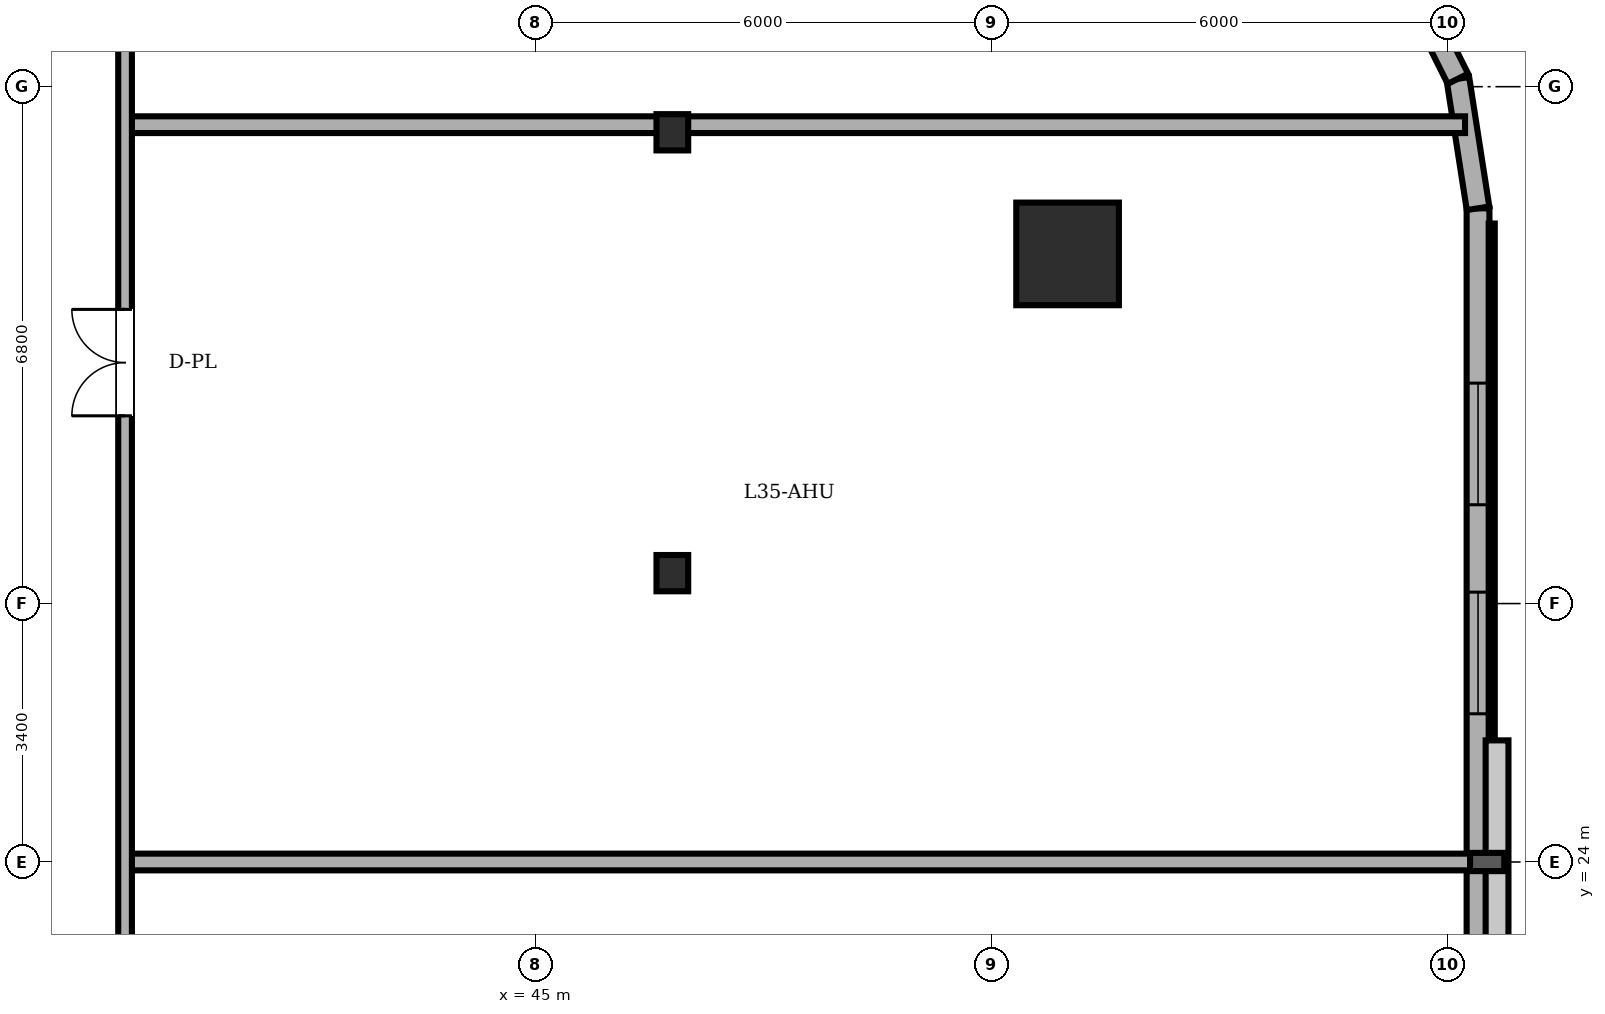
"""IFC4 building model, lengths in metres.
Left out: names, types, materials, properties, quantities, classifications, styles, units other than length and angle.
Written with IfcOpenShell. Run it as: python <this file> out.ifc"""

import sys

from ifc_helpers import new_model, si_unit, direction, frame, frame_2d, origin, origin_2d, place, context, subcontext, project, spatial, rectangle, circle, i_section, extrude, element, fill, save


model = new_model("IFC4")
c1 = context("Model", 3, precision=1e-05, world=origin(), true_north=direction((0.0, 1.0)))
c2 = subcontext(c1, "Body", "Model", "MODEL_VIEW")
j1 = project(units=[si_unit("LENGTHUNIT", "METRE"), si_unit("PLANEANGLEUNIT", "RADIAN")], contexts=[c1])
p1 = place(None, origin())
s1 = spatial("IfcSite", under=j1, at=p1, CompositionType="ELEMENT")
p2 = place(p1, origin())
s2 = spatial("IfcBuilding", under=s1, at=p2, CompositionType="ELEMENT")
p3 = place(p2, frame((0.0, 0.0, 133.1)))
s3 = spatial("IfcBuildingStorey", under=s2, at=p3, CompositionType="ELEMENT", Elevation=133.1)
p4 = place(p3, frame((52.0, 32.0, 0.0), z_axis=(0.0, 0.0, 1.0), x_axis=(1.0, 0.0, 0.0)))
e1 = element("IfcColumn", 1, at=p4, inside=s3, PredefinedType="COLUMN", context=c2, shape_type="SweptSolid", body=[
    extrude(circle(Radius=0.675, at=origin_2d()), origin(), (0.0, 0.0, 1.0), 2.96),
])
for number, where, z_axis, x_axis in (
    (2, (46.8, 27.8, 0.0), (0.0, 0.0, 1.0), (1.0, 0.0, 0.0)),
    (3, (46.8, 33.6, 0.0), (0.0, 0.0, 1.0), (1.0, 0.0, 0.0)),
):
    element("IfcColumn", number, at=place(p3, frame(where, z_axis=z_axis, x_axis=x_axis)), inside=s3, PredefinedType="COLUMN", context=c2, shape_type="SweptSolid", body=[
        extrude(i_section(OverallWidth=0.417, OverallDepth=0.477, WebThickness=0.036, FlangeThickness=0.057, FilletRadius=0.015, at=origin_2d()), origin(), (0.0, 0.0, 1.0), 2.96),
    ])
p5 = place(p3, frame((57.4, 15.4, 0.0), z_axis=(0.0, 0.0, 1.0), x_axis=(0.0, 1.0, 0.0)))
e4 = element("IfcWall", 4, at=p5, inside=s3, PredefinedType="SOLIDWALL", context=c2, shape_type="SweptSolid", body=[
    extrude(rectangle(XDim=17.2, YDim=0.3, at=frame_2d((8.6, 0.0))), origin(), (0.0, 0.0, 1.0), 5.36),
])
p6 = place(p5, frame((2.4, 0.0, 0.85)))
e5 = element("IfcOpeningElement", 5, at=p6, cuts=e4, PredefinedType="OPENING", context=c2, shape_type="SweptSolid", body=[
    extrude(rectangle(XDim=1.6, YDim=1.2, at=frame_2d((0.8, 0.6))), frame((0.0, 0.16, 0.0), z_axis=(0.0, -1.0, 0.0), x_axis=(1.0, 0.0, 0.0)), (0.0, 0.0, 1.0), 0.32),
])
p7 = place(p5, frame((6.0, 0.0, 0.85)))
e6 = element("IfcOpeningElement", 6, at=p7, cuts=e4, PredefinedType="OPENING", context=c2, shape_type="SweptSolid", body=[
    extrude(rectangle(XDim=1.6, YDim=1.2, at=frame_2d((0.8, 0.6))), frame((0.0, 0.16, 0.0), z_axis=(0.0, -1.0, 0.0), x_axis=(1.0, 0.0, 0.0)), (0.0, 0.0, 1.0), 0.32),
])
p8 = place(p5, frame((10.55, 0.0, 0.85)))
e7 = element("IfcOpeningElement", 7, at=p8, cuts=e4, PredefinedType="OPENING", context=c2, shape_type="SweptSolid", body=[
    extrude(rectangle(XDim=1.6, YDim=1.2, at=frame_2d((0.8, 0.6))), frame((0.0, 0.16, 0.0), z_axis=(0.0, -1.0, 0.0), x_axis=(1.0, 0.0, 0.0)), (0.0, 0.0, 1.0), 0.32),
])
p9 = place(p5, frame((13.3, 0.0, 0.85)))
e8 = element("IfcOpeningElement", 8, at=p9, cuts=e4, PredefinedType="OPENING", context=c2, shape_type="SweptSolid", body=[
    extrude(rectangle(XDim=1.6, YDim=1.2, at=frame_2d((0.8, 0.6))), frame((0.0, 0.16, 0.0), z_axis=(0.0, -1.0, 0.0), x_axis=(1.0, 0.0, 0.0)), (0.0, 0.0, 1.0), 0.32),
])
p10 = place(p3, frame((57.4, 32.6, 0.0), z_axis=(0.0, 0.0, 1.0), x_axis=(-0.153620989032, 0.988129845581, 0.0)))
e9 = element("IfcWall", 9, at=p10, inside=s3, PredefinedType="SOLIDWALL", context=c2, shape_type="SweptSolid", body=[
    extrude(rectangle(XDim=1.724, YDim=0.3, at=frame_2d((0.862, 0.0))), origin(), (0.0, 0.0, 1.0), 5.36),
])
p11 = place(p3, frame((57.135, 34.304, 0.0), z_axis=(0.0, 0.0, 1.0), x_axis=(-0.4472135955, 0.894427191, 0.0)))
e10 = element("IfcWall", 10, at=p11, inside=s3, PredefinedType="SOLIDWALL", context=c2, shape_type="SweptSolid", body=[
    extrude(rectangle(XDim=1.724, YDim=0.3, at=frame_2d((0.862, 0.0))), origin(), (0.0, 0.0, 1.0), 5.36),
])
p12 = place(p3, frame((39.6, 24.0, 0.0), z_axis=(0.0, 0.0, 1.0), x_axis=(1.0, 0.0, 0.0)))
e11 = element("IfcWall", 11, at=p12, inside=s3, PredefinedType="PARTITIONING", context=c2, shape_type="SweptSolid", body=[
    extrude(rectangle(XDim=17.8, YDim=0.22, at=frame_2d((8.9, 0.0))), origin(), (0.0, 0.0, 1.0), 5.012),
])
p13 = place(p3, frame((39.6, 33.7, 0.0), z_axis=(0.0, 0.0, 1.0), x_axis=(1.0, 0.0, 0.0)))
e12 = element("IfcWall", 12, at=p13, inside=s3, PredefinedType="PARTITIONING", context=c2, shape_type="SweptSolid", body=[
    extrude(rectangle(XDim=17.629, YDim=0.22, at=frame_2d((8.814, 0.0))), origin(), (0.0, 0.0, 1.0), 2.942),
])
p14 = place(p3, frame((39.6, 11.8, 0.0), z_axis=(0.0, 0.0, 1.0), x_axis=(0.0, 1.0, 0.0)))
e13 = element("IfcWall", 13, at=p14, inside=s3, PredefinedType="PARTITIONING", context=c2, shape_type="SweptSolid", body=[
    extrude(rectangle(XDim=24.4, YDim=0.18, at=frame_2d((12.2, 0.0))), origin(), (0.0, 0.0, 1.0), 5.36),
])
p15 = place(p14, frame((18.07, 0.0, 0.0)))
e14 = element("IfcOpeningElement", 14, at=p15, cuts=e13, PredefinedType="OPENING", context=c2, shape_type="SweptSolid", body=[
    extrude(rectangle(XDim=1.4, YDim=2.25, at=frame_2d((0.7, 1.125))), frame((0.0, 0.1, 0.0), z_axis=(0.0, -1.0, 0.0), x_axis=(1.0, 0.0, 0.0)), (0.0, 0.0, 1.0), 0.2),
])
p16 = place(p14, frame((5.6, 0.0, 0.0)))
e15 = element("IfcOpeningElement", 15, at=p16, cuts=e13, PredefinedType="OPENING", context=c2, shape_type="SweptSolid", body=[
    extrude(rectangle(XDim=1.4, YDim=2.25, at=frame_2d((0.7, 1.125))), frame((0.0, 0.1, 0.0), z_axis=(0.0, -1.0, 0.0), x_axis=(1.0, 0.0, 0.0)), (0.0, 0.0, 1.0), 0.2),
])
p17 = place(p14, frame((9.7, 0.0, 0.0)))
e16 = element("IfcOpeningElement", 16, at=p17, cuts=e13, PredefinedType="OPENING", context=c2, shape_type="SweptSolid", body=[
    extrude(rectangle(XDim=1.4, YDim=2.25, at=frame_2d((0.7, 1.125))), frame((0.0, 0.1, 0.0), z_axis=(0.0, -1.0, 0.0), x_axis=(1.0, 0.0, 0.0)), (0.0, 0.0, 1.0), 0.2),
])
p18 = place(p8, origin())
e17 = element("IfcWindow", 17, at=p18, inside=s3, PartitioningType="DOUBLE_PANEL_VERTICAL", PredefinedType="WINDOW", context=c2, shape_type="SweptSolid", body=[
    extrude(rectangle(XDim=1.6, YDim=1.2, at=frame_2d((0.8, 0.6))), frame((0.0, 0.03, 0.0), z_axis=(0.0, -1.0, 0.0), x_axis=(1.0, 0.0, 0.0)), (0.0, 0.0, 1.0), 0.06),
])
fill(e7, e17)
p19 = place(p9, origin())
e18 = element("IfcWindow", 18, at=p19, inside=s3, PartitioningType="DOUBLE_PANEL_VERTICAL", PredefinedType="WINDOW", context=c2, shape_type="SweptSolid", body=[
    extrude(rectangle(XDim=1.6, YDim=1.2, at=frame_2d((0.8, 0.6))), frame((0.0, 0.03, 0.0), z_axis=(0.0, -1.0, 0.0), x_axis=(1.0, 0.0, 0.0)), (0.0, 0.0, 1.0), 0.06),
])
fill(e8, e18)
p20 = place(p15, origin())
e19 = element("IfcDoor", 19, at=p20, inside=s3, OperationType="DOUBLE_DOOR_SINGLE_SWING", PredefinedType="DOOR", context=c2, shape_type="SweptSolid", body=[
    extrude(rectangle(XDim=1.4, YDim=2.25, at=frame_2d((0.7, 1.125))), frame((0.0, 0.025, 0.0), z_axis=(0.0, -1.0, 0.0), x_axis=(1.0, 0.0, 0.0)), (0.0, 0.0, 1.0), 0.05),
])
fill(e14, e19)
save(model, sys.argv[1])
